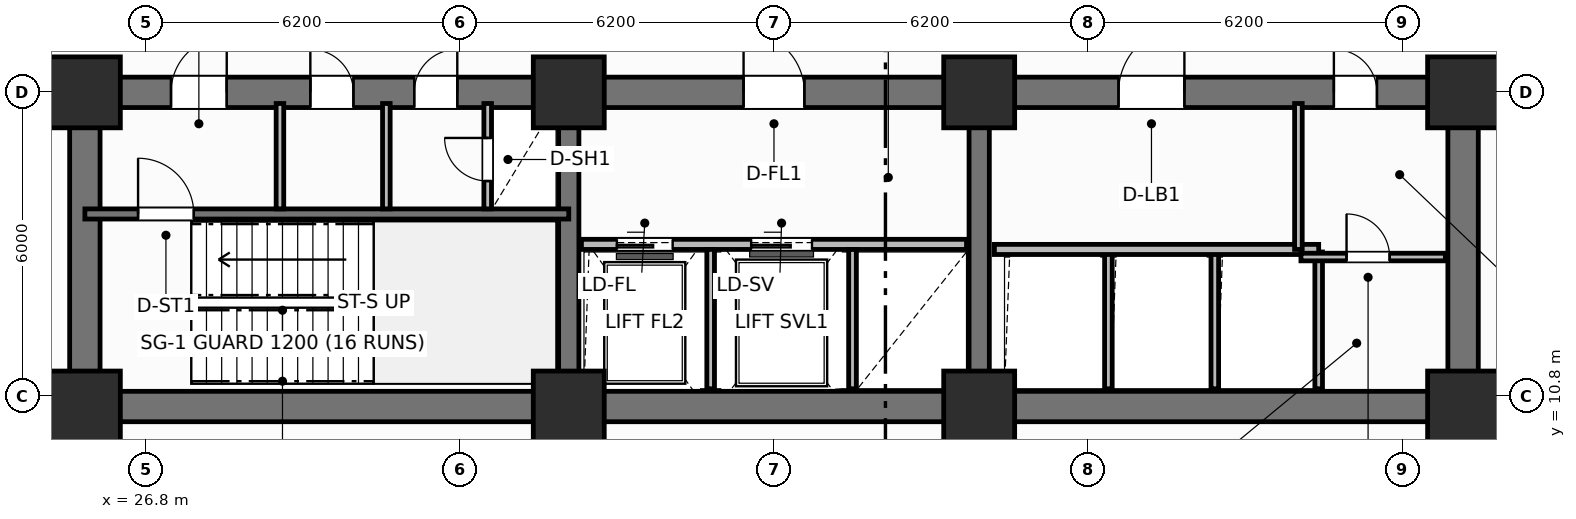
"""IFC4 building model, lengths in metres.
Left out: names, types, materials, properties, quantities, classifications, styles, units other than length and angle.
Written with IfcOpenShell. Run it as: python <this file> out.ifc"""

import sys

from ifc_helpers import new_model, si_unit, direction, frame, frame_2d, origin, origin_2d, place, context, subcontext, project, spatial, rectangle, extrude, element, fill, save


model = new_model("IFC4")
c1 = context("Model", 3, precision=1e-05, world=origin(), true_north=direction((0.0, 1.0)))
c2 = subcontext(c1, "Body", "Model", "MODEL_VIEW")
j1 = project(units=[si_unit("LENGTHUNIT", "METRE"), si_unit("PLANEANGLEUNIT", "RADIAN")], contexts=[c1])
p1 = place(None, origin())
s1 = spatial("IfcSite", under=j1, at=p1, CompositionType="ELEMENT")
p2 = place(p1, origin())
s2 = spatial("IfcBuilding", under=s1, at=p2, CompositionType="ELEMENT")
p3 = place(p2, frame((0.0, 0.0, 15.6)))
s3 = spatial("IfcBuildingStorey", under=s2, at=p3, CompositionType="ELEMENT", Elevation=15.6)
p4 = place(p3, frame((52.8, 10.6, 0.0), z_axis=(0.0, 0.0, 1.0), x_axis=(-1.0, 0.0, 0.0)))
e1 = element("IfcWall", 1, at=p4, inside=s3, PredefinedType="SHEAR", context=c2, shape_type="SweptSolid", body=[
    extrude(rectangle(XDim=27.2, YDim=0.6, at=frame_2d((13.6, 0.0))), origin(), (0.0, 0.0, 1.0), 4.5),
])
for number, where, z_axis, x_axis in (
    (2, (25.6, 10.9, 0.0), (0.0, 0.0, 1.0), (0.0, 1.0, 0.0)),
    (3, (52.8, 10.9, 0.0), (0.0, 0.0, 1.0), (0.0, 1.0, 0.0)),
):
    element("IfcWall", number, at=place(p3, frame(where, z_axis=z_axis, x_axis=x_axis)), inside=s3, PredefinedType="SHEAR", context=c2, shape_type="SweptSolid", body=[
        extrude(rectangle(XDim=5.6, YDim=0.6, at=frame_2d((2.8, 0.0))), origin(), (0.0, 0.0, 1.0), 4.5),
    ])
p5 = place(p3, frame((25.6, 16.8, 0.0), z_axis=(0.0, 0.0, 1.0), x_axis=(1.0, 0.0, 0.0)))
e4 = element("IfcWall", 4, at=p5, inside=s3, PredefinedType="SHEAR", context=c2, shape_type="SweptSolid", body=[
    extrude(rectangle(XDim=27.2, YDim=0.6, at=frame_2d((13.6, 0.0))), origin(), (0.0, 0.0, 1.0), 4.5),
])
p6 = place(p5, frame((1.7, 0.0, 0.0)))
e5 = element("IfcOpeningElement", 5, at=p6, cuts=e4, PredefinedType="OPENING", context=c2, shape_type="SweptSolid", body=[
    extrude(rectangle(XDim=1.1, YDim=2.15, at=frame_2d((0.55, 1.075))), frame((0.0, 0.31, 0.0), z_axis=(0.0, -1.0, 0.0), x_axis=(1.0, 0.0, 0.0)), (0.0, 0.0, 1.0), 0.62),
])
p7 = place(p5, frame((4.45, 0.0, 0.0)))
e6 = element("IfcOpeningElement", 6, at=p7, cuts=e4, PredefinedType="OPENING", context=c2, shape_type="SweptSolid", body=[
    extrude(rectangle(XDim=0.85, YDim=2.1, at=frame_2d((0.425, 1.05))), frame((0.0, 0.31, 0.0), z_axis=(0.0, -1.0, 0.0), x_axis=(1.0, 0.0, 0.0)), (0.0, 0.0, 1.0), 0.62),
])
p8 = place(p5, frame((6.5, 0.0, 0.0)))
e7 = element("IfcOpeningElement", 7, at=p8, cuts=e4, PredefinedType="OPENING", context=c2, shape_type="SweptSolid", body=[
    extrude(rectangle(XDim=0.85, YDim=2.1, at=frame_2d((0.425, 1.05))), frame((0.0, 0.31, 0.0), z_axis=(0.0, -1.0, 0.0), x_axis=(1.0, 0.0, 0.0)), (0.0, 0.0, 1.0), 0.62),
])
p9 = place(p5, frame((13.0, 0.0, 0.0)))
e8 = element("IfcOpeningElement", 8, at=p9, cuts=e4, PredefinedType="OPENING", context=c2, shape_type="SweptSolid", body=[
    extrude(rectangle(XDim=1.2, YDim=2.15, at=frame_2d((0.6, 1.075))), frame((0.0, 0.31, 0.0), z_axis=(0.0, -1.0, 0.0), x_axis=(1.0, 0.0, 0.0)), (0.0, 0.0, 1.0), 0.62),
])
p10 = place(p5, frame((20.4, 0.0, 0.0)))
e9 = element("IfcOpeningElement", 9, at=p10, cuts=e4, PredefinedType="OPENING", context=c2, shape_type="SweptSolid", body=[
    extrude(rectangle(XDim=1.3, YDim=2.2, at=frame_2d((0.65, 1.1))), frame((0.0, 0.31, 0.0), z_axis=(0.0, -1.0, 0.0), x_axis=(1.0, 0.0, 0.0)), (0.0, 0.0, 1.0), 0.62),
])
p11 = place(p5, frame((24.65, 0.0, 0.0)))
e10 = element("IfcOpeningElement", 10, at=p11, cuts=e4, PredefinedType="OPENING", context=c2, shape_type="SweptSolid", body=[
    extrude(rectangle(XDim=0.85, YDim=2.1, at=frame_2d((0.425, 1.05))), frame((0.0, 0.31, 0.0), z_axis=(0.0, -1.0, 0.0), x_axis=(1.0, 0.0, 0.0)), (0.0, 0.0, 1.0), 0.62),
])
for number, where, z_axis, x_axis in (
    (11, (35.15, 10.9, 0.0), (0.0, 0.0, 1.0), (0.0, 1.0, 0.0)),
    (12, (43.25, 10.9, 0.0), (0.0, 0.0, 1.0), (0.0, 1.0, 0.0)),
):
    element("IfcWall", number, at=place(p3, frame(where, z_axis=z_axis, x_axis=x_axis)), inside=s3, PredefinedType="SHEAR", context=c2, shape_type="SweptSolid", body=[
        extrude(rectangle(XDim=5.6, YDim=0.4, at=frame_2d((2.8, 0.0))), origin(), (0.0, 0.0, 1.0), 4.5),
    ])
for number, where, z_axis, x_axis in (
    (13, (25.6, 10.6, 0.0), (0.0, 0.0, 1.0), (1.0, 0.0, 0.0)),
    (14, (25.6, 16.8, 0.0), (0.0, 0.0, 1.0), (1.0, 0.0, 0.0)),
    (15, (35.15, 10.6, 0.0), (0.0, 0.0, 1.0), (1.0, 0.0, 0.0)),
    (16, (35.15, 16.8, 0.0), (0.0, 0.0, 1.0), (1.0, 0.0, 0.0)),
    (17, (43.25, 10.6, 0.0), (0.0, 0.0, 1.0), (1.0, 0.0, 0.0)),
    (18, (43.25, 16.8, 0.0), (0.0, 0.0, 1.0), (1.0, 0.0, 0.0)),
    (19, (52.8, 10.6, 0.0), (0.0, 0.0, 1.0), (1.0, 0.0, 0.0)),
    (20, (52.8, 16.8, 0.0), (0.0, 0.0, 1.0), (1.0, 0.0, 0.0)),
):
    element("IfcColumn", number, at=place(p3, frame(where, z_axis=z_axis, x_axis=x_axis)), inside=s3, PredefinedType="COLUMN", context=c2, shape_type="SweptSolid", body=[
        extrude(rectangle(XDim=1.4, YDim=1.4, at=origin_2d()), origin(), (0.0, 0.0, 1.0), 4.5),
    ])
p12 = place(p3, frame((25.6, 14.4, 0.0), z_axis=(0.0, 0.0, 1.0), x_axis=(1.0, 0.0, 0.0)))
e21 = element("IfcWall", 21, at=p12, inside=s3, PredefinedType="SHEAR", context=c2, shape_type="SweptSolid", body=[
    extrude(rectangle(XDim=9.55, YDim=0.2, at=frame_2d((4.775, 0.0))), origin(), (0.0, 0.0, 1.0), 4.5),
])
p13 = place(p12, frame((1.05, 0.0, 0.0)))
e22 = element("IfcOpeningElement", 22, at=p13, cuts=e21, PredefinedType="OPENING", context=c2, shape_type="SweptSolid", body=[
    extrude(rectangle(XDim=1.1, YDim=2.15, at=frame_2d((0.55, 1.075))), frame((0.0, 0.11, 0.0), z_axis=(0.0, -1.0, 0.0), x_axis=(1.0, 0.0, 0.0)), (0.0, 0.0, 1.0), 0.22),
])
for number, where, z_axis, x_axis in (
    (23, (29.45, 14.5, 0.0), (0.0, 0.0, 1.0), (0.0, 1.0, 0.0)),
    (24, (31.55, 14.5, 0.0), (0.0, 0.0, 1.0), (0.0, 1.0, 0.0)),
):
    element("IfcWall", number, at=place(p3, frame(where, z_axis=z_axis, x_axis=x_axis)), inside=s3, PredefinedType="PARTITIONING", context=c2, shape_type="SweptSolid", body=[
        extrude(rectangle(XDim=2.08, YDim=0.15, at=frame_2d((1.04, 0.0))), origin(), (0.0, 0.0, 1.0), 3.42),
    ])
p14 = place(p3, frame((33.55, 14.5, 0.0), z_axis=(0.0, 0.0, 1.0), x_axis=(0.0, 1.0, 0.0)))
e25 = element("IfcWall", 25, at=p14, inside=s3, PredefinedType="PARTITIONING", context=c2, shape_type="SweptSolid", body=[
    extrude(rectangle(XDim=2.08, YDim=0.15, at=frame_2d((1.04, 0.0))), origin(), (0.0, 0.0, 1.0), 3.42),
])
p15 = place(p14, frame((0.55, 0.0, 0.0)))
e26 = element("IfcOpeningElement", 26, at=p15, cuts=e25, PredefinedType="OPENING", context=c2, shape_type="SweptSolid", body=[
    extrude(rectangle(XDim=0.85, YDim=2.05, at=frame_2d((0.425, 1.025))), frame((0.0, 0.085, 0.0), z_axis=(0.0, -1.0, 0.0), x_axis=(1.0, 0.0, 0.0)), (0.0, 0.0, 1.0), 0.17),
])
p16 = place(p3, frame((35.4, 13.8, 0.0), z_axis=(0.0, 0.0, 1.0), x_axis=(1.0, 0.0, 0.0)))
e27 = element("IfcWall", 27, at=p16, inside=s3, PredefinedType="PARTITIONING", context=c2, shape_type="SweptSolid", body=[
    extrude(rectangle(XDim=7.6, YDim=0.2, at=frame_2d((3.8, 0.0))), origin(), (0.0, 0.0, 1.0), 3.08),
])
p17 = place(p16, frame((0.7, 0.0, 0.0)))
e28 = element("IfcOpeningElement", 28, at=p17, cuts=e27, PredefinedType="OPENING", context=c2, shape_type="SweptSolid", body=[
    extrude(rectangle(XDim=1.1, YDim=2.15, at=frame_2d((0.55, 1.075))), frame((0.0, 0.11, 0.0), z_axis=(0.0, -1.0, 0.0), x_axis=(1.0, 0.0, 0.0)), (0.0, 0.0, 1.0), 0.22),
])
p18 = place(p16, frame((3.35, 0.0, 0.0)))
e29 = element("IfcOpeningElement", 29, at=p18, cuts=e27, PredefinedType="OPENING", context=c2, shape_type="SweptSolid", body=[
    extrude(rectangle(XDim=1.2, YDim=2.15, at=frame_2d((0.6, 1.075))), frame((0.0, 0.11, 0.0), z_axis=(0.0, -1.0, 0.0), x_axis=(1.0, 0.0, 0.0)), (0.0, 0.0, 1.0), 0.22),
])
for number, where, z_axis, x_axis in (
    (30, (37.95, 10.95, 0.0), (0.0, 0.0, 1.0), (0.0, 1.0, 0.0)),
    (31, (40.75, 10.95, 0.0), (0.0, 0.0, 1.0), (0.0, 1.0, 0.0)),
):
    element("IfcWall", number, at=place(p3, frame(where, z_axis=z_axis, x_axis=x_axis)), inside=s3, PredefinedType="PARTITIONING", context=c2, shape_type="SweptSolid", body=[
        extrude(rectangle(XDim=2.75, YDim=0.15, at=frame_2d((1.375, 0.0))), origin(), (0.0, 0.0, 1.0), 3.42),
    ])
for number, where, z_axis, x_axis in (
    (32, (45.8, 10.95, 0.0), (0.0, 0.0, 1.0), (0.0, 1.0, 0.0)),
    (33, (47.9, 10.95, 0.0), (0.0, 0.0, 1.0), (0.0, 1.0, 0.0)),
    (34, (49.95, 10.95, 0.0), (0.0, 0.0, 1.0), (0.0, 1.0, 0.0)),
):
    element("IfcWall", number, at=place(p3, frame(where, z_axis=z_axis, x_axis=x_axis)), inside=s3, PredefinedType="PARTITIONING", context=c2, shape_type="SweptSolid", body=[
        extrude(rectangle(XDim=2.7, YDim=0.15, at=frame_2d((1.35, 0.0))), origin(), (0.0, 0.0, 1.0), 3.42),
    ])
p19 = place(p3, frame((43.55, 13.7, 0.0), z_axis=(0.0, 0.0, 1.0), x_axis=(1.0, 0.0, 0.0)))
e35 = element("IfcWall", 35, at=p19, inside=s3, PredefinedType="PARTITIONING", context=c2, shape_type="SweptSolid", body=[
    extrude(rectangle(XDim=6.4, YDim=0.2, at=frame_2d((3.2, 0.0))), origin(), (0.0, 0.0, 1.0), 3.42),
])
p20 = place(p3, frame((49.55, 13.7, 0.0), z_axis=(0.0, 0.0, 1.0), x_axis=(0.0, 1.0, 0.0)))
e36 = element("IfcWall", 36, at=p20, inside=s3, PredefinedType="PARTITIONING", context=c2, shape_type="SweptSolid", body=[
    extrude(rectangle(XDim=2.88, YDim=0.15, at=frame_2d((1.44, 0.0))), origin(), (0.0, 0.0, 1.0), 3.42),
])
p21 = place(p3, frame((49.6, 13.55, 0.0), z_axis=(0.0, 0.0, 1.0), x_axis=(1.0, 0.0, 0.0)))
e37 = element("IfcWall", 37, at=p21, inside=s3, PredefinedType="PARTITIONING", context=c2, shape_type="SweptSolid", body=[
    extrude(rectangle(XDim=2.85, YDim=0.15, at=frame_2d((1.425, 0.0))), origin(), (0.0, 0.0, 1.0), 3.42),
])
p22 = place(p21, frame((0.9, 0.0, 0.0)))
e38 = element("IfcOpeningElement", 38, at=p22, cuts=e37, PredefinedType="OPENING", context=c2, shape_type="SweptSolid", body=[
    extrude(rectangle(XDim=0.85, YDim=2.1, at=frame_2d((0.425, 1.05))), frame((0.0, 0.085, 0.0), z_axis=(0.0, -1.0, 0.0), x_axis=(1.0, 0.0, 0.0)), (0.0, 0.0, 1.0), 0.17),
])
p23 = place(p3, frame((12.0, 16.85, 0.0), z_axis=(0.0, 0.0, 1.0), x_axis=(1.0, 0.0, 0.0)))
e39 = element("IfcWall", 39, at=p23, inside=s3, PredefinedType="PARTITIONING", context=c2, shape_type="SweptSolid", body=[
    extrude(rectangle(XDim=13.25, YDim=0.15, at=frame_2d((6.625, 0.0))), origin(), (0.0, 0.0, 1.0), 3.42),
])
p24 = place(p23, frame((7.5, 0.0, 0.0)))
e40 = element("IfcOpeningElement", 40, at=p24, cuts=e39, PredefinedType="OPENING", context=c2, shape_type="SweptSolid", body=[
    extrude(rectangle(XDim=1.0, YDim=2.15, at=frame_2d((0.5, 1.075))), frame((0.0, 0.085, 0.0), z_axis=(0.0, -1.0, 0.0), x_axis=(1.0, 0.0, 0.0)), (0.0, 0.0, 1.0), 0.17),
])
p25 = place(p3, frame((53.15, 16.85, 0.0), z_axis=(0.0, 0.0, 1.0), x_axis=(1.0, 0.0, 0.0)))
e41 = element("IfcWall", 41, at=p25, inside=s3, PredefinedType="PARTITIONING", context=c2, shape_type="SweptSolid", body=[
    extrude(rectangle(XDim=13.25, YDim=0.15, at=frame_2d((6.625, 0.0))), origin(), (0.0, 0.0, 1.0), 3.42),
])
p26 = place(p25, frame((4.2, 0.0, 0.0)))
e42 = element("IfcOpeningElement", 42, at=p26, cuts=e41, PredefinedType="OPENING", context=c2, shape_type="SweptSolid", body=[
    extrude(rectangle(XDim=1.0, YDim=2.15, at=frame_2d((0.5, 1.075))), frame((0.0, 0.085, 0.0), z_axis=(0.0, -1.0, 0.0), x_axis=(1.0, 0.0, 0.0)), (0.0, 0.0, 1.0), 0.17),
])
p27 = place(p13, origin())
e43 = element("IfcDoor", 43, at=p27, inside=s3, OperationType="SINGLE_SWING_LEFT", PredefinedType="DOOR", context=c2, shape_type="SweptSolid", body=[
    extrude(rectangle(XDim=1.1, YDim=2.15, at=frame_2d((0.55, 1.075))), frame((0.0, 0.025, 0.0), z_axis=(0.0, -1.0, 0.0), x_axis=(1.0, 0.0, 0.0)), (0.0, 0.0, 1.0), 0.05),
])
fill(e22, e43)
p28 = place(p15, origin())
e44 = element("IfcDoor", 44, at=p28, inside=s3, OperationType="SINGLE_SWING_RIGHT", PredefinedType="TRAPDOOR", context=c2, shape_type="SweptSolid", body=[
    extrude(rectangle(XDim=0.85, YDim=2.05, at=frame_2d((0.425, 1.025))), frame((0.0, 0.025, 0.0), z_axis=(0.0, -1.0, 0.0), x_axis=(1.0, 0.0, 0.0)), (0.0, 0.0, 1.0), 0.05),
])
fill(e26, e44)
p29 = place(p17, origin())
e45 = element("IfcDoor", 45, at=p29, inside=s3, OperationType="SLIDING_TO_LEFT", PredefinedType="DOOR", context=c2, shape_type="SweptSolid", body=[
    extrude(rectangle(XDim=1.1, YDim=2.15, at=frame_2d((0.55, 1.075))), frame((0.0, 0.025, 0.0), z_axis=(0.0, -1.0, 0.0), x_axis=(1.0, 0.0, 0.0)), (0.0, 0.0, 1.0), 0.05),
])
fill(e28, e45)
p30 = place(p18, origin())
e46 = element("IfcDoor", 46, at=p30, inside=s3, OperationType="SLIDING_TO_LEFT", PredefinedType="DOOR", context=c2, shape_type="SweptSolid", body=[
    extrude(rectangle(XDim=1.2, YDim=2.15, at=frame_2d((0.6, 1.075))), frame((0.0, 0.025, 0.0), z_axis=(0.0, -1.0, 0.0), x_axis=(1.0, 0.0, 0.0)), (0.0, 0.0, 1.0), 0.05),
])
fill(e29, e46)
p31 = place(p22, origin())
e47 = element("IfcDoor", 47, at=p31, inside=s3, OperationType="SINGLE_SWING_LEFT", PredefinedType="DOOR", context=c2, shape_type="SweptSolid", body=[
    extrude(rectangle(XDim=0.85, YDim=2.1, at=frame_2d((0.425, 1.05))), frame((0.0, 0.025, 0.0), z_axis=(0.0, -1.0, 0.0), x_axis=(1.0, 0.0, 0.0)), (0.0, 0.0, 1.0), 0.05),
])
fill(e38, e47)
p32 = place(p6, origin())
e48 = element("IfcDoor", 48, at=p32, inside=s3, OperationType="SINGLE_SWING_RIGHT", PredefinedType="DOOR", context=c2, shape_type="SweptSolid", body=[
    extrude(rectangle(XDim=1.1, YDim=2.15, at=frame_2d((0.55, 1.075))), frame((0.0, 0.025, 0.0), z_axis=(0.0, -1.0, 0.0), x_axis=(1.0, 0.0, 0.0)), (0.0, 0.0, 1.0), 0.05),
])
fill(e5, e48)
p33 = place(p7, origin())
e49 = element("IfcDoor", 49, at=p33, inside=s3, OperationType="SINGLE_SWING_LEFT", PredefinedType="DOOR", context=c2, shape_type="SweptSolid", body=[
    extrude(rectangle(XDim=0.85, YDim=2.1, at=frame_2d((0.425, 1.05))), frame((0.0, 0.025, 0.0), z_axis=(0.0, -1.0, 0.0), x_axis=(1.0, 0.0, 0.0)), (0.0, 0.0, 1.0), 0.05),
])
fill(e6, e49)
p34 = place(p8, origin())
e50 = element("IfcDoor", 50, at=p34, inside=s3, OperationType="SINGLE_SWING_RIGHT", PredefinedType="DOOR", context=c2, shape_type="SweptSolid", body=[
    extrude(rectangle(XDim=0.85, YDim=2.1, at=frame_2d((0.425, 1.05))), frame((0.0, 0.025, 0.0), z_axis=(0.0, -1.0, 0.0), x_axis=(1.0, 0.0, 0.0)), (0.0, 0.0, 1.0), 0.05),
])
fill(e7, e50)
p35 = place(p9, origin())
e51 = element("IfcDoor", 51, at=p35, inside=s3, OperationType="SINGLE_SWING_LEFT", PredefinedType="DOOR", context=c2, shape_type="SweptSolid", body=[
    extrude(rectangle(XDim=1.2, YDim=2.15, at=frame_2d((0.6, 1.075))), frame((0.0, 0.025, 0.0), z_axis=(0.0, -1.0, 0.0), x_axis=(1.0, 0.0, 0.0)), (0.0, 0.0, 1.0), 0.05),
])
fill(e8, e51)
p36 = place(p10, origin())
e52 = element("IfcDoor", 52, at=p36, inside=s3, OperationType="SINGLE_SWING_RIGHT", PredefinedType="DOOR", context=c2, shape_type="SweptSolid", body=[
    extrude(rectangle(XDim=1.3, YDim=2.2, at=frame_2d((0.65, 1.1))), frame((0.0, 0.025, 0.0), z_axis=(0.0, -1.0, 0.0), x_axis=(1.0, 0.0, 0.0)), (0.0, 0.0, 1.0), 0.05),
])
fill(e9, e52)
p37 = place(p11, origin())
e53 = element("IfcDoor", 53, at=p37, inside=s3, OperationType="SINGLE_SWING_LEFT", PredefinedType="DOOR", context=c2, shape_type="SweptSolid", body=[
    extrude(rectangle(XDim=0.85, YDim=2.1, at=frame_2d((0.425, 1.05))), frame((0.0, 0.025, 0.0), z_axis=(0.0, -1.0, 0.0), x_axis=(1.0, 0.0, 0.0)), (0.0, 0.0, 1.0), 0.05),
])
fill(e10, e53)
save(model, sys.argv[1])
